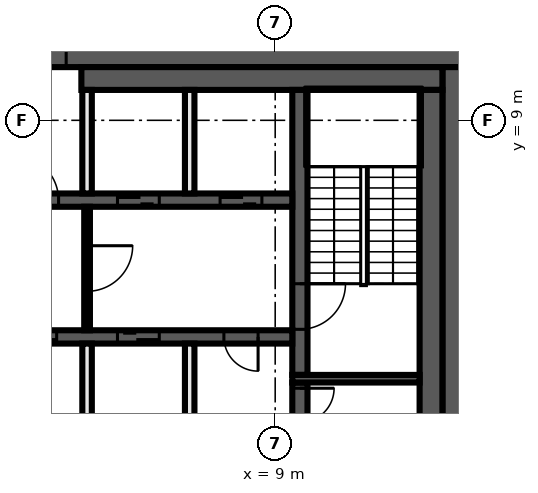
"""IFC4 building model, lengths in metres.
Left out: names, types, materials, properties, quantities, classifications, styles, units other than length and angle.
Written with IfcOpenShell. Run it as: python <this file> out.ifc"""

import sys

from ifc_helpers import new_model, si_unit, direction, frame, frame_2d, origin, place, context, subcontext, project, spatial, rectangle, extrude, element, fill, save


model = new_model("IFC4")
c1 = context("Model", 3, precision=1e-05, world=origin(), true_north=direction((0.0, 1.0)))
c2 = subcontext(c1, "Body", "Model", "MODEL_VIEW")
j1 = project(units=[si_unit("LENGTHUNIT", "METRE"), si_unit("PLANEANGLEUNIT", "RADIAN")], contexts=[c1])
p1 = place(None, origin())
s1 = spatial("IfcSite", under=j1, at=p1, CompositionType="ELEMENT")
p2 = place(p1, origin())
s2 = spatial("IfcBuilding", under=s1, at=p2, CompositionType="ELEMENT")
p3 = place(p2, frame((0.0, 0.0, 359.0)))
s3 = spatial("IfcBuildingStorey", under=s2, at=p3, CompositionType="ELEMENT", Elevation=359.0)
p4 = place(p3, frame((11.367, -20.469, 0.0), z_axis=(0.0, 0.0, 1.0), x_axis=(0.424125024155, 0.905603646131, 0.0)))
e1 = element("IfcWall", 1, at=p4, inside=s3, PredefinedType="SOLIDWALL", context=c2, shape_type="SweptSolid", body=[
    extrude(rectangle(XDim=28.801, YDim=0.25, at=frame_2d((14.401, 0.0))), origin(), (0.0, 0.0, 1.0), 3.8),
])
p5 = place(p3, frame((23.583, 5.614, 0.0), z_axis=(0.0, 0.0, 1.0), x_axis=(-0.671256862452, 0.741224813812, 0.0)))
e2 = element("IfcWall", 2, at=p5, inside=s3, PredefinedType="SOLIDWALL", context=c2, shape_type="SweptSolid", body=[
    extrude(rectangle(XDim=20.856, YDim=0.25, at=frame_2d((10.428, 0.0))), origin(), (0.0, 0.0, 1.0), 3.8),
])
p6 = place(p3, frame((-14.0, 10.7, 0.0), z_axis=(0.0, 0.0, 1.0), x_axis=(1.0, 0.0, 0.0)))
e3 = element("IfcWall", 3, at=p6, inside=s3, PredefinedType="SHEAR", context=c2, shape_type="SweptSolid", body=[
    extrude(rectangle(XDim=28.0, YDim=0.6, at=frame_2d((14.0, 0.0))), origin(), (0.0, 0.0, 1.0), 3.8),
])
p7 = place(p6, frame((15.9, 0.0, 0.0)))
e4 = element("IfcOpeningElement", 4, at=p7, cuts=e3, PredefinedType="OPENING", context=c2, shape_type="SweptSolid", body=[
    extrude(rectangle(XDim=1.6, YDim=2.1, at=frame_2d((0.8, 1.05))), frame((0.0, 0.31, 0.0), z_axis=(0.0, -1.0, 0.0), x_axis=(1.0, 0.0, 0.0)), (0.0, 0.0, 1.0), 0.62),
])
p8 = place(p3, frame((13.7, 10.4, 0.0), z_axis=(0.0, 0.0, 1.0), x_axis=(0.0, -1.0, 0.0)))
e5 = element("IfcWall", 5, at=p8, inside=s3, PredefinedType="SHEAR", context=c2, shape_type="SweptSolid", body=[
    extrude(rectangle(XDim=20.8, YDim=0.6, at=frame_2d((10.4, 0.0))), origin(), (0.0, 0.0, 1.0), 3.8),
])
p9 = place(p3, frame((3.9, 10.1, 0.0), z_axis=(0.0, 0.0, 1.0), x_axis=(1.0, 0.0, 0.0)))
e6 = element("IfcWall", 6, at=p9, inside=s3, PredefinedType="SHEAR", context=c2, shape_type="SweptSolid", body=[
    extrude(rectangle(XDim=9.5, YDim=0.6, at=frame_2d((4.75, 0.0))), origin(), (0.0, 0.0, 1.0), 3.8),
])
p10 = place(p3, frame((13.1, 9.8, 0.0), z_axis=(0.0, 0.0, 1.0), x_axis=(0.0, -1.0, 0.0)))
e7 = element("IfcWall", 7, at=p10, inside=s3, PredefinedType="SHEAR", context=c2, shape_type="SweptSolid", body=[
    extrude(rectangle(XDim=19.6, YDim=0.6, at=frame_2d((9.8, 0.0))), origin(), (0.0, 0.0, 1.0), 3.8),
])
p11 = place(p3, frame((9.65, 2.1, 0.0), z_axis=(0.0, 0.0, 1.0), x_axis=(0.0, -1.0, 0.0)))
e8 = element("IfcWall", 8, at=p11, inside=s3, PredefinedType="SHEAR", context=c2, shape_type="SweptSolid", body=[
    extrude(rectangle(XDim=4.2, YDim=0.4, at=frame_2d((2.1, 0.0))), origin(), (0.0, 0.0, 1.0), 3.8),
])
p12 = place(p11, frame((0.15, 0.0, 0.0)))
e9 = element("IfcOpeningElement", 9, at=p12, cuts=e8, PredefinedType="OPENING", context=c2, shape_type="SweptSolid", body=[
    extrude(rectangle(XDim=0.9, YDim=2.1, at=frame_2d((0.45, 1.05))), frame((0.0, 0.21, 0.0), z_axis=(0.0, -1.0, 0.0), x_axis=(1.0, 0.0, 0.0)), (0.0, 0.0, 1.0), 0.42),
])
p13 = place(p3, frame((9.65, 9.8, 0.0), z_axis=(0.0, 0.0, 1.0), x_axis=(0.0, -1.0, 0.0)))
e10 = element("IfcWall", 10, at=p13, inside=s3, PredefinedType="SHEAR", context=c2, shape_type="SweptSolid", body=[
    extrude(rectangle(XDim=7.5, YDim=0.4, at=frame_2d((3.75, 0.0))), origin(), (0.0, 0.0, 1.0), 3.8),
])
p14 = place(p13, frame((5.1, 0.0, 0.0)))
e11 = element("IfcOpeningElement", 11, at=p14, cuts=e10, PredefinedType="OPENING", context=c2, shape_type="SweptSolid", body=[
    extrude(rectangle(XDim=1.2, YDim=2.1, at=frame_2d((0.6, 1.05))), frame((0.0, 0.21, 0.0), z_axis=(0.0, -1.0, 0.0), x_axis=(1.0, 0.0, 0.0)), (0.0, 0.0, 1.0), 0.42),
])
p15 = place(p3, frame((9.45, 2.2, 0.0), z_axis=(0.0, 0.0, 1.0), x_axis=(1.0, 0.0, 0.0)))
e12 = element("IfcWall", 12, at=p15, inside=s3, PredefinedType="SHEAR", context=c2, shape_type="SweptSolid", body=[
    extrude(rectangle(XDim=3.35, YDim=0.2, at=frame_2d((1.675, 0.0))), origin(), (0.0, 0.0, 1.0), 3.8),
])
p16 = place(p3, frame((-9.45, 6.9, 0.0), z_axis=(0.0, 0.0, 1.0), x_axis=(1.0, 0.0, 0.0)))
e13 = element("IfcWall", 13, at=p16, inside=s3, PredefinedType="SHEAR", context=c2, shape_type="SweptSolid", body=[
    extrude(rectangle(XDim=18.9, YDim=0.35, at=frame_2d((9.45, 0.0))), origin(), (0.0, 0.0, 1.0), 3.8),
])
p17 = place(p16, frame((11.55, 0.0, 0.0)))
e14 = element("IfcOpeningElement", 14, at=p17, cuts=e13, PredefinedType="OPENING", context=c2, shape_type="SweptSolid", body=[
    extrude(rectangle(XDim=1.2, YDim=2.1, at=frame_2d((0.6, 1.05))), frame((0.0, 0.185, 0.0), z_axis=(0.0, -1.0, 0.0), x_axis=(1.0, 0.0, 0.0)), (0.0, 0.0, 1.0), 0.37),
])
p18 = place(p16, frame((14.3, 0.0, 0.0)))
e15 = element("IfcOpeningElement", 15, at=p18, cuts=e13, PredefinedType="OPENING", context=c2, shape_type="SweptSolid", body=[
    extrude(rectangle(XDim=1.1, YDim=2.1, at=frame_2d((0.55, 1.05))), frame((0.0, 0.185, 0.0), z_axis=(0.0, -1.0, 0.0), x_axis=(1.0, 0.0, 0.0)), (0.0, 0.0, 1.0), 0.37),
])
p19 = place(p16, frame((17.0, 0.0, 0.0)))
e16 = element("IfcOpeningElement", 16, at=p19, cuts=e13, PredefinedType="OPENING", context=c2, shape_type="SweptSolid", body=[
    extrude(rectangle(XDim=1.1, YDim=2.1, at=frame_2d((0.55, 1.05))), frame((0.0, 0.185, 0.0), z_axis=(0.0, -1.0, 0.0), x_axis=(1.0, 0.0, 0.0)), (0.0, 0.0, 1.0), 0.37),
])
p20 = place(p16, frame((2.25, 0.0, 0.0)))
e17 = element("IfcOpeningElement", 17, at=p20, cuts=e13, PredefinedType="OPENING", context=c2, shape_type="SweptSolid", body=[
    extrude(rectangle(XDim=0.9, YDim=2.1, at=frame_2d((0.45, 1.05))), frame((0.0, 0.185, 0.0), z_axis=(0.0, -1.0, 0.0), x_axis=(1.0, 0.0, 0.0)), (0.0, 0.0, 1.0), 0.37),
])
p21 = place(p16, frame((7.65, 0.0, 0.0)))
e18 = element("IfcOpeningElement", 18, at=p21, cuts=e13, PredefinedType="OPENING", context=c2, shape_type="SweptSolid", body=[
    extrude(rectangle(XDim=0.9, YDim=2.1, at=frame_2d((0.45, 1.05))), frame((0.0, 0.185, 0.0), z_axis=(0.0, -1.0, 0.0), x_axis=(1.0, 0.0, 0.0)), (0.0, 0.0, 1.0), 0.37),
])
p22 = place(p3, frame((9.45, 3.3, 0.0), z_axis=(0.0, 0.0, 1.0), x_axis=(-1.0, 0.0, 0.0)))
e19 = element("IfcWall", 19, at=p22, inside=s3, PredefinedType="SHEAR", context=c2, shape_type="SweptSolid", body=[
    extrude(rectangle(XDim=18.9, YDim=0.35, at=frame_2d((9.45, 0.0))), origin(), (0.0, 0.0, 1.0), 3.8),
])
p23 = place(p22, frame((6.2, 0.0, 0.0)))
e20 = element("IfcOpeningElement", 20, at=p23, cuts=e19, PredefinedType="OPENING", context=c2, shape_type="SweptSolid", body=[
    extrude(rectangle(XDim=1.1, YDim=2.1, at=frame_2d((0.55, 1.05))), frame((0.0, 0.185, 0.0), z_axis=(0.0, -1.0, 0.0), x_axis=(1.0, 0.0, 0.0)), (0.0, 0.0, 1.0), 0.37),
])
p24 = place(p22, frame((3.5, 0.0, 0.0)))
e21 = element("IfcOpeningElement", 21, at=p24, cuts=e19, PredefinedType="OPENING", context=c2, shape_type="SweptSolid", body=[
    extrude(rectangle(XDim=1.1, YDim=2.1, at=frame_2d((0.55, 1.05))), frame((0.0, 0.185, 0.0), z_axis=(0.0, -1.0, 0.0), x_axis=(1.0, 0.0, 0.0)), (0.0, 0.0, 1.0), 0.37),
])
p25 = place(p22, frame((0.9, 0.0, 0.0)))
e22 = element("IfcOpeningElement", 22, at=p25, cuts=e19, PredefinedType="OPENING", context=c2, shape_type="SweptSolid", body=[
    extrude(rectangle(XDim=0.9, YDim=2.1, at=frame_2d((0.45, 1.05))), frame((0.0, 0.185, 0.0), z_axis=(0.0, -1.0, 0.0), x_axis=(1.0, 0.0, 0.0)), (0.0, 0.0, 1.0), 0.37),
])
p26 = place(p22, frame((17.1, 0.0, 0.0)))
e23 = element("IfcOpeningElement", 23, at=p26, cuts=e19, PredefinedType="OPENING", context=c2, shape_type="SweptSolid", body=[
    extrude(rectangle(XDim=0.9, YDim=2.1, at=frame_2d((0.45, 1.05))), frame((0.0, 0.185, 0.0), z_axis=(0.0, -1.0, 0.0), x_axis=(1.0, 0.0, 0.0)), (0.0, 0.0, 1.0), 0.37),
])
p27 = place(p22, frame((11.7, 0.0, 0.0)))
e24 = element("IfcOpeningElement", 24, at=p27, cuts=e19, PredefinedType="OPENING", context=c2, shape_type="SweptSolid", body=[
    extrude(rectangle(XDim=0.9, YDim=2.1, at=frame_2d((0.45, 1.05))), frame((0.0, 0.185, 0.0), z_axis=(0.0, -1.0, 0.0), x_axis=(1.0, 0.0, 0.0)), (0.0, 0.0, 1.0), 0.37),
])
for number, where, z_axis, x_axis in (
    (25, (6.75, 0.4, 0.0), (0.0, 0.0, 1.0), (0.0, 1.0, 0.0)),
    (26, (6.75, 7.075, 0.0), (0.0, 0.0, 1.0), (0.0, 1.0, 0.0)),
):
    element("IfcWall", number, at=place(p3, frame(where, z_axis=z_axis, x_axis=x_axis)), inside=s3, PredefinedType="SOLIDWALL", context=c2, shape_type="SweptSolid", body=[
        extrude(rectangle(XDim=2.725, YDim=0.25, at=frame_2d((1.363, 0.0))), origin(), (0.0, 0.0, 1.0), 3.8),
    ])
p28 = place(p3, frame((4.05, 6.725, 0.0), z_axis=(0.0, 0.0, 1.0), x_axis=(0.0, -1.0, 0.0)))
e27 = element("IfcWall", 27, at=p28, inside=s3, PredefinedType="PARTITIONING", context=c2, shape_type="SweptSolid", body=[
    extrude(rectangle(XDim=3.25, YDim=0.15, at=frame_2d((1.625, 0.0))), origin(), (0.0, 0.0, 1.0), 3.8),
])
p29 = place(p28, frame((1.025, 0.0, 0.0)))
e28 = element("IfcOpeningElement", 28, at=p29, cuts=e27, PredefinedType="OPENING", context=c2, shape_type="SweptSolid", body=[
    extrude(rectangle(XDim=1.2, YDim=2.1, at=frame_2d((0.6, 1.05))), frame((0.0, 0.085, 0.0), z_axis=(0.0, -1.0, 0.0), x_axis=(1.0, 0.0, 0.0)), (0.0, 0.0, 1.0), 0.17),
])
for number, where, z_axis, x_axis in (
    (29, (4.05, 0.4, 0.0), (0.0, 0.0, 1.0), (0.0, 1.0, 0.0)),
    (30, (4.05, 7.075, 0.0), (0.0, 0.0, 1.0), (0.0, 1.0, 0.0)),
):
    element("IfcWall", number, at=place(p3, frame(where, z_axis=z_axis, x_axis=x_axis)), inside=s3, PredefinedType="SOLIDWALL", context=c2, shape_type="SweptSolid", body=[
        extrude(rectangle(XDim=2.725, YDim=0.25, at=frame_2d((1.363, 0.0))), origin(), (0.0, 0.0, 1.0), 3.8),
    ])
p30 = place(p12, origin())
e31 = element("IfcDoor", 31, at=p30, inside=s3, OperationType="SINGLE_SWING_RIGHT", PredefinedType="DOOR", context=c2, shape_type="SweptSolid", body=[
    extrude(rectangle(XDim=0.9, YDim=2.1, at=frame_2d((0.45, 1.05))), frame((0.0, 0.025, 0.0), z_axis=(0.0, -1.0, 0.0), x_axis=(1.0, 0.0, 0.0)), (0.0, 0.0, 1.0), 0.05),
])
fill(e9, e31)
p31 = place(p7, origin())
e32 = element("IfcDoor", 32, at=p31, inside=s3, OperationType="DOUBLE_DOOR_SINGLE_SWING", PredefinedType="DOOR", context=c2, shape_type="SweptSolid", body=[
    extrude(rectangle(XDim=1.6, YDim=2.1, at=frame_2d((0.8, 1.05))), frame((0.0, 0.025, 0.0), z_axis=(0.0, -1.0, 0.0), x_axis=(1.0, 0.0, 0.0)), (0.0, 0.0, 1.0), 0.05),
])
fill(e4, e32)
p32 = place(p17, origin())
e33 = element("IfcDoor", 33, at=p32, inside=s3, OperationType="SINGLE_SWING_LEFT", PredefinedType="DOOR", context=c2, shape_type="SweptSolid", body=[
    extrude(rectangle(XDim=1.2, YDim=2.1, at=frame_2d((0.6, 1.05))), frame((0.0, 0.025, 0.0), z_axis=(0.0, -1.0, 0.0), x_axis=(1.0, 0.0, 0.0)), (0.0, 0.0, 1.0), 0.05),
])
fill(e14, e33)
p33 = place(p18, origin())
e34 = element("IfcDoor", 34, at=p33, inside=s3, OperationType="DOUBLE_DOOR_SLIDING", PredefinedType="DOOR", context=c2, shape_type="SweptSolid", body=[
    extrude(rectangle(XDim=1.1, YDim=2.1, at=frame_2d((0.55, 1.05))), frame((0.0, 0.025, 0.0), z_axis=(0.0, -1.0, 0.0), x_axis=(1.0, 0.0, 0.0)), (0.0, 0.0, 1.0), 0.05),
])
fill(e15, e34)
p34 = place(p19, origin())
e35 = element("IfcDoor", 35, at=p34, inside=s3, OperationType="DOUBLE_DOOR_SLIDING", PredefinedType="DOOR", context=c2, shape_type="SweptSolid", body=[
    extrude(rectangle(XDim=1.1, YDim=2.1, at=frame_2d((0.55, 1.05))), frame((0.0, 0.025, 0.0), z_axis=(0.0, -1.0, 0.0), x_axis=(1.0, 0.0, 0.0)), (0.0, 0.0, 1.0), 0.05),
])
fill(e16, e35)
p35 = place(p23, origin())
e36 = element("IfcDoor", 36, at=p35, inside=s3, OperationType="DOUBLE_DOOR_SLIDING", PredefinedType="DOOR", context=c2, shape_type="SweptSolid", body=[
    extrude(rectangle(XDim=1.1, YDim=2.1, at=frame_2d((0.55, 1.05))), frame((0.0, 0.025, 0.0), z_axis=(0.0, -1.0, 0.0), x_axis=(1.0, 0.0, 0.0)), (0.0, 0.0, 1.0), 0.05),
])
fill(e20, e36)
p36 = place(p24, origin())
e37 = element("IfcDoor", 37, at=p36, inside=s3, OperationType="DOUBLE_DOOR_SLIDING", PredefinedType="DOOR", context=c2, shape_type="SweptSolid", body=[
    extrude(rectangle(XDim=1.1, YDim=2.1, at=frame_2d((0.55, 1.05))), frame((0.0, 0.025, 0.0), z_axis=(0.0, -1.0, 0.0), x_axis=(1.0, 0.0, 0.0)), (0.0, 0.0, 1.0), 0.05),
])
fill(e21, e37)
p37 = place(p25, origin())
e38 = element("IfcDoor", 38, at=p37, inside=s3, OperationType="SINGLE_SWING_LEFT", PredefinedType="DOOR", context=c2, shape_type="SweptSolid", body=[
    extrude(rectangle(XDim=0.9, YDim=2.1, at=frame_2d((0.45, 1.05))), frame((0.0, 0.025, 0.0), z_axis=(0.0, -1.0, 0.0), x_axis=(1.0, 0.0, 0.0)), (0.0, 0.0, 1.0), 0.05),
])
fill(e22, e38)
p38 = place(p14, origin())
e39 = element("IfcDoor", 39, at=p38, inside=s3, OperationType="SINGLE_SWING_LEFT", PredefinedType="DOOR", context=c2, shape_type="SweptSolid", body=[
    extrude(rectangle(XDim=1.2, YDim=2.1, at=frame_2d((0.6, 1.05))), frame((0.0, 0.025, 0.0), z_axis=(0.0, -1.0, 0.0), x_axis=(1.0, 0.0, 0.0)), (0.0, 0.0, 1.0), 0.05),
])
fill(e11, e39)
p39 = place(p29, origin())
e40 = element("IfcDoor", 40, at=p39, inside=s3, OperationType="SINGLE_SWING_RIGHT", PredefinedType="DOOR", context=c2, shape_type="SweptSolid", body=[
    extrude(rectangle(XDim=1.2, YDim=2.1, at=frame_2d((0.6, 1.05))), frame((0.0, 0.025, 0.0), z_axis=(0.0, -1.0, 0.0), x_axis=(1.0, 0.0, 0.0)), (0.0, 0.0, 1.0), 0.05),
])
fill(e28, e40)
save(model, sys.argv[1])
